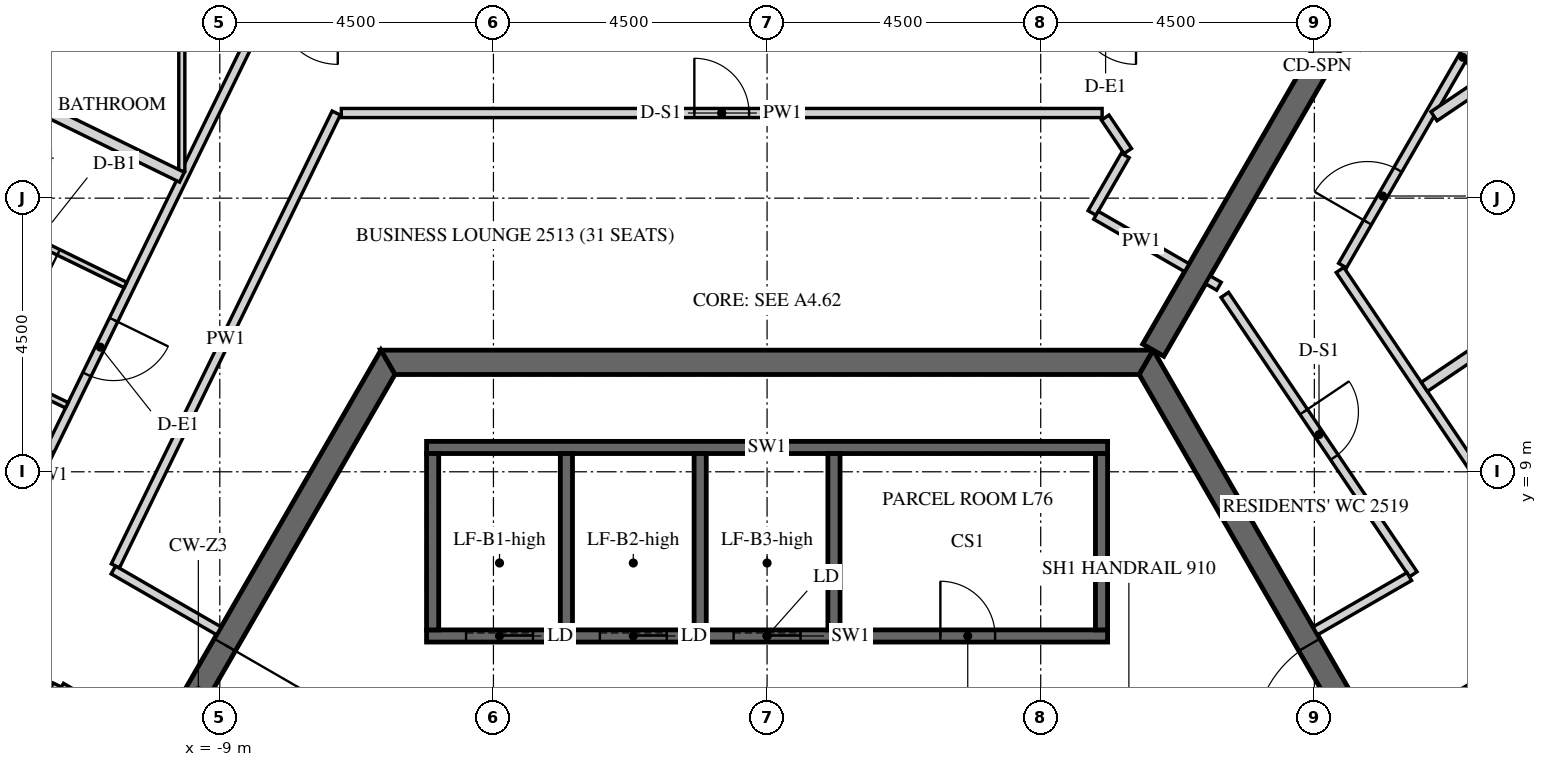
"""IFC4 building model, lengths in metres.
Left out: names, types, materials, properties, quantities, classifications, styles, units other than length and angle.
Written with IfcOpenShell. Run it as: python <this file> out.ifc"""

import sys

from ifc_helpers import new_model, si_unit, direction, frame, frame_2d, origin, place, context, subcontext, project, spatial, polyline, rectangle, outline, extrude, element, fill, save


model = new_model("IFC4")
c1 = context("Model", 3, precision=1e-05, world=origin(), true_north=direction((0.0, 1.0)))
c2 = subcontext(c1, "Body", "Model", "MODEL_VIEW")
j1 = project(units=[si_unit("LENGTHUNIT", "METRE"), si_unit("PLANEANGLEUNIT", "RADIAN")], contexts=[c1])
p1 = place(None, origin())
s1 = spatial("IfcSite", under=j1, at=p1, CompositionType="ELEMENT")
p2 = place(p1, origin())
s2 = spatial("IfcBuilding", under=s1, at=p2, CompositionType="ELEMENT")
p3 = place(p2, frame((0.0, 0.0, 314.7)))
s3 = spatial("IfcBuildingStorey", under=s2, at=p3, CompositionType="ELEMENT", Elevation=314.7)
p4 = place(p3, frame((-6.235, 10.8, -0.15), z_axis=(0.0, 0.0, 1.0), x_axis=(-0.499996419489, -0.866027470984, 0.0)))
e1 = element("IfcWall", 1, at=p4, inside=s3, PredefinedType="SHEAR", context=c2, shape_type="SweptSolid", body=[
    extrude(outline(polyline([(-0.115, -0.2), (12.586, -0.2), (12.355, 0.2), (0.115, 0.2), (-0.115, -0.2)])), origin(), (0.0, 0.0, 1.0), 3.9),
])
p5 = place(p4, frame((5.364, 0.0, 0.15)))
e2 = element("IfcOpeningElement", 2, at=p5, cuts=e1, PredefinedType="OPENING", context=c2, shape_type="SweptSolid", body=[
    extrude(rectangle(XDim=1.8, YDim=2.4, at=frame_2d((0.9, 1.2))), frame((0.0, 0.21, 0.0), z_axis=(0.0, -1.0, 0.0), x_axis=(1.0, 0.0, 0.0)), (0.0, 0.0, 1.0), 0.42),
])
p6 = place(p3, frame((12.471, 0.0, -0.15), z_axis=(0.0, 0.0, 1.0), x_axis=(-0.499996419489, 0.866027470984, 0.0)))
e3 = element("IfcWall", 3, at=p6, inside=s3, PredefinedType="SHEAR", context=c2, shape_type="SweptSolid", body=[
    extrude(outline(polyline([(-0.115, -0.2), (12.586, -0.2), (12.355, 0.2), (0.115, 0.2), (-0.115, -0.2)])), origin(), (0.0, 0.0, 1.0), 3.9),
])
p7 = place(p6, frame((5.306, 0.0, 0.15)))
e4 = element("IfcOpeningElement", 4, at=p7, cuts=e3, PredefinedType="OPENING", context=c2, shape_type="SweptSolid", body=[
    extrude(rectangle(XDim=1.8, YDim=2.4, at=frame_2d((0.9, 1.2))), frame((0.0, 0.21, 0.0), z_axis=(0.0, -1.0, 0.0), x_axis=(1.0, 0.0, 0.0)), (0.0, 0.0, 1.0), 0.42),
])
p8 = place(p3, frame((6.235, 10.8, -0.15), z_axis=(0.0, 0.0, 1.0), x_axis=(-1.0, 0.0, 0.0)))
e5 = element("IfcWall", 5, at=p8, inside=s3, PredefinedType="SHEAR", context=c2, shape_type="SweptSolid", body=[
    extrude(outline(polyline([(-0.115, -0.2), (12.586, -0.2), (12.355, 0.2), (0.115, 0.2), (-0.115, -0.2)])), origin(), (0.0, 0.0, 1.0), 3.9),
])
p9 = place(p3, frame((6.351, 11.0, -0.15), z_axis=(0.0, 0.0, 1.0), x_axis=(0.499998894578, 0.866026041999, 0.0)))
e6 = element("IfcWall", 6, at=p9, inside=s3, PredefinedType="SHEAR", context=c2, shape_type="SweptSolid", body=[
    extrude(rectangle(XDim=15.544, YDim=0.4, at=frame_2d((7.772, 0.0))), origin(), (0.0, 0.0, 1.0), 3.9),
])
p10 = place(p9, frame((6.872, 0.0, 0.15)))
e7 = element("IfcOpeningElement", 7, at=p10, cuts=e6, PredefinedType="OPENING", context=c2, shape_type="SweptSolid", body=[
    extrude(rectangle(XDim=1.8, YDim=2.4, at=frame_2d((0.9, 1.2))), frame((0.0, 0.21, 0.0), z_axis=(0.0, -1.0, 0.0), x_axis=(1.0, 0.0, 0.0)), (0.0, 0.0, 1.0), 0.42),
])
p11 = place(p3, frame((-5.6, 6.3, -0.25), z_axis=(0.0, 0.0, 1.0), x_axis=(1.0, 0.0, 0.0)))
e8 = element("IfcWall", 8, at=p11, inside=s3, PredefinedType="SHEAR", context=c2, shape_type="SweptSolid", body=[
    extrude(rectangle(XDim=11.2, YDim=0.2, at=frame_2d((5.6, 0.0))), origin(), (0.0, 0.0, 1.0), 3.9),
])
p12 = place(p11, frame((8.45, 0.0, 0.25)))
e9 = element("IfcOpeningElement", 9, at=p12, cuts=e8, PredefinedType="OPENING", context=c2, shape_type="SweptSolid", body=[
    extrude(rectangle(XDim=0.9, YDim=2.1, at=frame_2d((0.45, 1.05))), frame((0.0, 0.11, 0.0), z_axis=(0.0, -1.0, 0.0), x_axis=(1.0, 0.0, 0.0)), (0.0, 0.0, 1.0), 0.22),
])
p13 = place(p11, frame((0.65, 0.0, 0.25)))
e10 = element("IfcOpeningElement", 10, at=p13, cuts=e8, PredefinedType="OPENING", context=c2, shape_type="SweptSolid", body=[
    extrude(rectangle(XDim=1.1, YDim=2.1, at=frame_2d((0.55, 1.05))), frame((0.0, 0.11, 0.0), z_axis=(0.0, -1.0, 0.0), x_axis=(1.0, 0.0, 0.0)), (0.0, 0.0, 1.0), 0.22),
])
p14 = place(p11, frame((2.85, 0.0, 0.25)))
e11 = element("IfcOpeningElement", 11, at=p14, cuts=e8, PredefinedType="OPENING", context=c2, shape_type="SweptSolid", body=[
    extrude(rectangle(XDim=1.1, YDim=2.1, at=frame_2d((0.55, 1.05))), frame((0.0, 0.11, 0.0), z_axis=(0.0, -1.0, 0.0), x_axis=(1.0, 0.0, 0.0)), (0.0, 0.0, 1.0), 0.22),
])
p15 = place(p11, frame((5.05, 0.0, 0.25)))
e12 = element("IfcOpeningElement", 12, at=p15, cuts=e8, PredefinedType="OPENING", context=c2, shape_type="SweptSolid", body=[
    extrude(rectangle(XDim=1.1, YDim=2.1, at=frame_2d((0.55, 1.05))), frame((0.0, 0.11, 0.0), z_axis=(0.0, -1.0, 0.0), x_axis=(1.0, 0.0, 0.0)), (0.0, 0.0, 1.0), 0.22),
])
p16 = place(p3, frame((-5.6, 9.4, -0.25), z_axis=(0.0, 0.0, 1.0), x_axis=(1.0, 0.0, 0.0)))
e13 = element("IfcWall", 13, at=p16, inside=s3, PredefinedType="SHEAR", context=c2, shape_type="SweptSolid", body=[
    extrude(rectangle(XDim=11.2, YDim=0.2, at=frame_2d((5.6, 0.0))), origin(), (0.0, 0.0, 1.0), 3.9),
])
for number, where, z_axis, x_axis in (
    (14, (-5.5, 6.4, -0.25), (0.0, 0.0, 1.0), (0.0, 1.0, 0.0)),
    (15, (-3.3, 6.4, -0.25), (0.0, 0.0, 1.0), (0.0, 1.0, 0.0)),
    (16, (-1.1, 6.4, -0.25), (0.0, 0.0, 1.0), (0.0, 1.0, 0.0)),
    (17, (1.1, 6.4, -0.25), (0.0, 0.0, 1.0), (0.0, 1.0, 0.0)),
    (18, (5.5, 6.4, -0.25), (0.0, 0.0, 1.0), (0.0, 1.0, 0.0)),
):
    element("IfcWall", number, at=place(p3, frame(where, z_axis=z_axis, x_axis=x_axis)), inside=s3, PredefinedType="SHEAR", context=c2, shape_type="SweptSolid", body=[
        extrude(rectangle(XDim=2.9, YDim=0.2, at=frame_2d((1.45, 0.0))), origin(), (0.0, 0.0, 1.0), 3.9),
    ])
p17 = place(p3, frame((-8.247, 16.625, 0.0), z_axis=(0.0, 0.0, 1.0), x_axis=(-0.438381655451, -0.898788920806, 0.0)))
e19 = element("IfcWall", 19, at=p17, inside=s3, PredefinedType="PARTITIONING", context=c2, shape_type="SweptSolid", body=[
    extrude(rectangle(XDim=16.272, YDim=0.15, at=frame_2d((8.136, 0.0))), origin(), (0.0, 0.0, 1.0), 2.988),
])
p18 = place(p17, frame((5.703, 0.0, 0.0)))
e20 = element("IfcOpeningElement", 20, at=p18, cuts=e19, PredefinedType="OPENING", context=c2, shape_type="SweptSolid", body=[
    extrude(rectangle(XDim=1.0, YDim=2.1, at=frame_2d((0.5, 1.05))), frame((0.0, 0.085, 0.0), z_axis=(0.0, -1.0, 0.0), x_axis=(1.0, 0.0, 0.0)), (0.0, 0.0, 1.0), 0.17),
])
p19 = place(p3, frame((-9.016, 6.384, 0.0), z_axis=(0.0, 0.0, 1.0), x_axis=(-0.866029291668, 0.499993265928, 0.0)))
e21 = element("IfcWall", 21, at=p19, inside=s3, PredefinedType="PARTITIONING", context=c2, shape_type="SweptSolid", body=[
    extrude(rectangle(XDim=2.003, YDim=0.15, at=frame_2d((1.001, 0.0))), origin(), (0.0, 0.0, 1.0), 2.988),
])
p20 = place(p3, frame((-10.717, 7.453, 0.0), z_axis=(0.0, 0.0, 1.0), x_axis=(0.438363251035, 0.898797897273, 0.0)))
e22 = element("IfcWall", 22, at=p20, inside=s3, PredefinedType="PARTITIONING", context=c2, shape_type="SweptSolid", body=[
    extrude(rectangle(XDim=8.285, YDim=0.15, at=frame_2d((4.143, 0.0))), origin(), (0.0, 0.0, 1.0), 2.988),
])
p21 = place(p3, frame((-7.002, 14.9, 0.0), z_axis=(0.0, 0.0, 1.0), x_axis=(1.0, 0.0, 0.0)))
e23 = element("IfcWall", 23, at=p21, inside=s3, PredefinedType="PARTITIONING", context=c2, shape_type="SweptSolid", body=[
    extrude(rectangle(XDim=12.512, YDim=0.15, at=frame_2d((6.256, 0.0))), origin(), (0.0, 0.0, 1.0), 2.988),
])
p22 = place(p21, frame((5.806, 0.0, 0.0)))
e24 = element("IfcOpeningElement", 24, at=p22, cuts=e23, PredefinedType="OPENING", context=c2, shape_type="SweptSolid", body=[
    extrude(rectangle(XDim=0.9, YDim=2.1, at=frame_2d((0.45, 1.05))), frame((0.0, 0.085, 0.0), z_axis=(0.0, -1.0, 0.0), x_axis=(1.0, 0.0, 0.0)), (0.0, 0.0, 1.0), 0.17),
])
p23 = place(p3, frame((5.561, 14.825, 0.0), z_axis=(0.0, 0.0, 1.0), x_axis=(0.559188682258, -0.829040419784, 0.0)))
e25 = element("IfcWall", 25, at=p23, inside=s3, PredefinedType="PARTITIONING", context=c2, shape_type="SweptSolid", body=[
    extrude(rectangle(XDim=0.664, YDim=0.15, at=frame_2d((0.332, 0.0))), origin(), (0.0, 0.0, 1.0), 2.988),
])
p24 = place(p3, frame((5.89, 14.202, 0.0), z_axis=(0.0, 0.0, 1.0), x_axis=(-0.499986987217, -0.866032916588, 0.0)))
e26 = element("IfcWall", 26, at=p24, inside=s3, PredefinedType="PARTITIONING", context=c2, shape_type="SweptSolid", body=[
    extrude(rectangle(XDim=1.092, YDim=0.15, at=frame_2d((0.546, 0.0))), origin(), (0.0, 0.0, 1.0), 2.988),
])
p25 = place(p3, frame((5.409, 13.219, 0.0), z_axis=(0.0, 0.0, 1.0), x_axis=(0.866013532718, -0.500020560727, 0.0)))
e27 = element("IfcWall", 27, at=p25, inside=s3, PredefinedType="PARTITIONING", context=c2, shape_type="SweptSolid", body=[
    extrude(rectangle(XDim=1.725, YDim=0.15, at=frame_2d((0.863, 0.0))), origin(), (0.0, 0.0, 1.0), 2.988),
])
p26 = place(p3, frame((-14.078, 0.564, 0.0), z_axis=(0.0, 0.0, 1.0), x_axis=(0.438378907599, 0.898790261058, 0.0)))
e28 = element("IfcWall", 28, at=p26, inside=s3, PredefinedType="PARTITIONING", context=c2, shape_type="SweptSolid", body=[
    extrude(rectangle(XDim=5.485, YDim=0.15, at=frame_2d((2.743, 0.0))), origin(), (0.0, 0.0, 1.0), 2.988),
])
p27 = place(p26, frame((2.292, 0.0, 0.0)))
e29 = element("IfcOpeningElement", 29, at=p27, cuts=e28, PredefinedType="OPENING", context=c2, shape_type="SweptSolid", body=[
    extrude(rectangle(XDim=0.9, YDim=2.1, at=frame_2d((0.45, 1.05))), frame((0.0, 0.085, 0.0), z_axis=(0.0, -1.0, 0.0), x_axis=(1.0, 0.0, 0.0)), (0.0, 0.0, 1.0), 0.17),
])
p28 = place(p3, frame((-11.608, 5.456, 0.0), z_axis=(0.0, 0.0, 1.0), x_axis=(0.866032625367, -0.499987491644, 0.0)))
e30 = element("IfcWall", 30, at=p28, inside=s3, PredefinedType="PARTITIONING", context=c2, shape_type="SweptSolid", body=[
    extrude(rectangle(XDim=1.781, YDim=0.15, at=frame_2d((0.89, 0.0))), origin(), (0.0, 0.0, 1.0), 2.988),
])
p29 = place(p3, frame((18.521, -1.171, 0.0), z_axis=(0.0, 0.0, 1.0), x_axis=(-0.559193232449, 0.829037350656, 0.0)))
e31 = element("IfcWall", 31, at=p29, inside=s3, PredefinedType="PARTITIONING", context=c2, shape_type="SweptSolid", body=[
    extrude(rectangle(XDim=16.272, YDim=0.15, at=frame_2d((8.136, 0.0))), origin(), (0.0, 0.0, 1.0), 2.988),
])
p30 = place(p29, frame((3.703, 0.0, 0.0)))
e32 = element("IfcOpeningElement", 32, at=p30, cuts=e31, PredefinedType="OPENING", context=c2, shape_type="SweptSolid", body=[
    extrude(rectangle(XDim=1.0, YDim=2.1, at=frame_2d((0.5, 1.05))), frame((0.0, 0.085, 0.0), z_axis=(0.0, -1.0, 0.0), x_axis=(1.0, 0.0, 0.0)), (0.0, 0.0, 1.0), 0.17),
])
p31 = place(p3, frame((9.464, 12.392, 0.0), z_axis=(0.0, 0.0, 1.0), x_axis=(0.499999400414, 0.866025749955, 0.0)))
e33 = element("IfcWall", 33, at=p31, inside=s3, PredefinedType="PARTITIONING", context=c2, shape_type="SweptSolid", body=[
    extrude(rectangle(XDim=7.911, YDim=0.15, at=frame_2d((3.955, 0.0))), origin(), (0.0, 0.0, 1.0), 2.988),
])
p32 = place(p31, frame((0.82, 0.0, 0.0)))
e34 = element("IfcOpeningElement", 34, at=p32, cuts=e33, PredefinedType="OPENING", context=c2, shape_type="SweptSolid", body=[
    extrude(rectangle(XDim=1.0, YDim=2.1, at=frame_2d((0.5, 1.05))), frame((0.0, 0.085, 0.0), z_axis=(0.0, -1.0, 0.0), x_axis=(1.0, 0.0, 0.0)), (0.0, 0.0, 1.0), 0.17),
])
p33 = place(p31, frame((4.817, 0.0, 0.0)))
e35 = element("IfcOpeningElement", 35, at=p33, cuts=e33, PredefinedType="OPENING", context=c2, shape_type="SweptSolid", body=[
    extrude(rectangle(XDim=1.0, YDim=2.1, at=frame_2d((0.5, 1.05))), frame((0.0, 0.085, 0.0), z_axis=(0.0, -1.0, 0.0), x_axis=(1.0, 0.0, 0.0)), (0.0, 0.0, 1.0), 0.17),
])
p34 = place(p3, frame((10.066, 4.566, 0.0), z_axis=(0.0, 0.0, 1.0), x_axis=(0.866033651025, 0.499985715088, 0.0)))
e36 = element("IfcWall", 36, at=p34, inside=s3, PredefinedType="PARTITIONING", context=c2, shape_type="SweptSolid", body=[
    extrude(rectangle(XDim=2.007, YDim=0.15, at=frame_2d((1.003, 0.0))), origin(), (0.0, 0.0, 1.0), 2.988),
])
p35 = place(p3, frame((7.25, 12.156, 0.0), z_axis=(0.0, 0.0, 1.0), x_axis=(0.866088799389, -0.499890179513, 0.0)))
e37 = element("IfcWall", 37, at=p35, inside=s3, PredefinedType="PARTITIONING", context=c2, shape_type="SweptSolid", body=[
    extrude(rectangle(XDim=0.21, YDim=0.15, at=frame_2d((0.105, 0.0))), origin(), (0.0, 0.0, 1.0), 2.988),
])
p36 = place(p3, frame((7.527, 11.91, 0.0), z_axis=(0.0, 0.0, 1.0), x_axis=(0.5592050336, -0.82902939055, 0.0)))
e38 = element("IfcWall", 38, at=p36, inside=s3, PredefinedType="PARTITIONING", context=c2, shape_type="SweptSolid", body=[
    extrude(rectangle(XDim=5.543, YDim=0.15, at=frame_2d((2.771, 0.0))), origin(), (0.0, 0.0, 1.0), 2.988),
])
p37 = place(p36, frame((2.322, 0.0, 0.0)))
e39 = element("IfcOpeningElement", 39, at=p37, cuts=e38, PredefinedType="OPENING", context=c2, shape_type="SweptSolid", body=[
    extrude(rectangle(XDim=0.9, YDim=2.1, at=frame_2d((0.45, 1.05))), frame((0.0, 0.085, 0.0), z_axis=(0.0, -1.0, 0.0), x_axis=(1.0, 0.0, 0.0)), (0.0, 0.0, 1.0), 0.17),
])
p38 = place(p3, frame((10.562, 7.277, 0.0), z_axis=(0.0, 0.0, 1.0), x_axis=(-0.86601248742, -0.500022371132, 0.0)))
e40 = element("IfcWall", 40, at=p38, inside=s3, PredefinedType="PARTITIONING", context=c2, shape_type="SweptSolid", body=[
    extrude(rectangle(XDim=1.785, YDim=0.15, at=frame_2d((0.893, 0.0))), origin(), (0.0, 0.0, 1.0), 2.988),
])
p39 = place(p3, frame((-9.625, 13.945, 0.0), z_axis=(0.0, 0.0, 1.0), x_axis=(0.0, 1.0, 0.0)))
e41 = element("IfcWall", 41, at=p39, inside=s3, PredefinedType="PARTITIONING", context=c2, shape_type="SweptSolid", body=[
    extrude(rectangle(XDim=6.155, YDim=0.1, at=frame_2d((3.077, 0.0))), origin(), (0.0, 0.0, 1.0), 2.988),
])
p40 = place(p39, frame((4.005, 0.0, 0.0)))
e42 = element("IfcOpeningElement", 42, at=p40, cuts=e41, PredefinedType="OPENING", context=c2, shape_type="SweptSolid", body=[
    extrude(rectangle(XDim=0.9, YDim=2.1, at=frame_2d((0.45, 1.05))), frame((0.0, 0.06, 0.0), z_axis=(0.0, -1.0, 0.0), x_axis=(1.0, 0.0, 0.0)), (0.0, 0.0, 1.0), 0.12),
])
p41 = place(p3, frame((-17.516, 17.694, 0.0), z_axis=(0.0, 0.0, 1.0), x_axis=(0.898787414812, -0.438384743092, 0.0)))
e43 = element("IfcWall", 43, at=p41, inside=s3, PredefinedType="PARTITIONING", context=c2, shape_type="SweptSolid", body=[
    extrude(rectangle(XDim=8.782, YDim=0.18, at=frame_2d((4.391, 0.0))), origin(), (0.0, 0.0, 1.0), 2.988),
])
p42 = place(p3, frame((-11.515, 10.094, 0.0), z_axis=(0.0, 0.0, 1.0), x_axis=(-0.898774796437, 0.438410612656, 0.0)))
e44 = element("IfcWall", 44, at=p42, inside=s3, PredefinedType="PARTITIONING", context=c2, shape_type="SweptSolid", body=[
    extrude(rectangle(XDim=3.325, YDim=0.1, at=frame_2d((1.663, 0.0))), origin(), (0.0, 0.0, 1.0), 2.988),
])
p43 = place(p42, frame((1.175, 0.0, 0.0)))
e45 = element("IfcOpeningElement", 45, at=p43, cuts=e44, PredefinedType="OPENING", context=c2, shape_type="SweptSolid", body=[
    extrude(rectangle(XDim=0.9, YDim=2.1, at=frame_2d((0.45, 1.05))), frame((0.0, 0.06, 0.0), z_axis=(0.0, -1.0, 0.0), x_axis=(1.0, 0.0, 0.0)), (0.0, 0.0, 1.0), 0.12),
])
p44 = place(p3, frame((-10.551, 12.072, 0.0), z_axis=(0.0, 0.0, 1.0), x_axis=(-0.898803726577, 0.438351298723, 0.0)))
e46 = element("IfcWall", 46, at=p44, inside=s3, PredefinedType="PARTITIONING", context=c2, shape_type="SweptSolid", body=[
    extrude(rectangle(XDim=3.325, YDim=0.1, at=frame_2d((1.663, 0.0))), origin(), (0.0, 0.0, 1.0), 2.988),
])
p45 = place(p44, frame((1.225, 0.0, 0.0)))
e47 = element("IfcOpeningElement", 47, at=p45, cuts=e46, PredefinedType="OPENING", context=c2, shape_type="SweptSolid", body=[
    extrude(rectangle(XDim=0.8, YDim=2.1, at=frame_2d((0.4, 1.05))), frame((0.0, 0.06, 0.0), z_axis=(0.0, -1.0, 0.0), x_axis=(1.0, 0.0, 0.0)), (0.0, 0.0, 1.0), 0.12),
])
p46 = place(p3, frame((18.042, 15.276, 0.0), z_axis=(0.0, 0.0, 1.0), x_axis=(-0.829028989438, -0.559205628254, 0.0)))
e48 = element("IfcWall", 48, at=p46, inside=s3, PredefinedType="PARTITIONING", context=c2, shape_type="SweptSolid", body=[
    extrude(rectangle(XDim=8.725, YDim=0.18, at=frame_2d((4.363, 0.0))), origin(), (0.0, 0.0, 1.0), 2.988),
])
p47 = place(p3, frame((16.029, 18.26, 0.0), z_axis=(0.0, 0.0, 1.0), x_axis=(-0.829048418375, -0.559176823545, 0.0)))
e49 = element("IfcWall", 49, at=p47, inside=s3, PredefinedType="PARTITIONING", context=c2, shape_type="SweptSolid", body=[
    extrude(rectangle(XDim=6.105, YDim=0.18, at=frame_2d((3.053, 0.0))), origin(), (0.0, 0.0, 1.0), 2.988),
])
p48 = place(p5, origin())
e50 = element("IfcDoor", 50, at=p48, inside=s3, OperationType="DOUBLE_DOOR_SINGLE_SWING", PredefinedType="DOOR", context=c2, shape_type="SweptSolid", body=[
    extrude(rectangle(XDim=1.8, YDim=2.4, at=frame_2d((0.9, 1.2))), frame((0.0, 0.025, 0.0), z_axis=(0.0, -1.0, 0.0), x_axis=(1.0, 0.0, 0.0)), (0.0, 0.0, 1.0), 0.05),
])
fill(e2, e50)
p49 = place(p7, origin())
e51 = element("IfcDoor", 51, at=p49, inside=s3, OperationType="DOUBLE_DOOR_SINGLE_SWING", PredefinedType="DOOR", context=c2, shape_type="SweptSolid", body=[
    extrude(rectangle(XDim=1.8, YDim=2.4, at=frame_2d((0.9, 1.2))), frame((0.0, 0.025, 0.0), z_axis=(0.0, -1.0, 0.0), x_axis=(1.0, 0.0, 0.0)), (0.0, 0.0, 1.0), 0.05),
])
fill(e4, e51)
p50 = place(p12, origin())
e52 = element("IfcDoor", 52, at=p50, inside=s3, OperationType="SINGLE_SWING_LEFT", PredefinedType="DOOR", context=c2, shape_type="SweptSolid", body=[
    extrude(rectangle(XDim=0.9, YDim=2.1, at=frame_2d((0.45, 1.05))), frame((0.0, 0.025, 0.0), z_axis=(0.0, -1.0, 0.0), x_axis=(1.0, 0.0, 0.0)), (0.0, 0.0, 1.0), 0.05),
])
fill(e9, e52)
p51 = place(p13, origin())
e53 = element("IfcDoor", 53, at=p51, inside=s3, OperationType="SLIDING_TO_LEFT", PredefinedType="DOOR", context=c2, shape_type="SweptSolid", body=[
    extrude(rectangle(XDim=1.1, YDim=2.1, at=frame_2d((0.55, 1.05))), frame((0.0, 0.025, 0.0), z_axis=(0.0, -1.0, 0.0), x_axis=(1.0, 0.0, 0.0)), (0.0, 0.0, 1.0), 0.05),
])
fill(e10, e53)
p52 = place(p14, origin())
e54 = element("IfcDoor", 54, at=p52, inside=s3, OperationType="SLIDING_TO_LEFT", PredefinedType="DOOR", context=c2, shape_type="SweptSolid", body=[
    extrude(rectangle(XDim=1.1, YDim=2.1, at=frame_2d((0.55, 1.05))), frame((0.0, 0.025, 0.0), z_axis=(0.0, -1.0, 0.0), x_axis=(1.0, 0.0, 0.0)), (0.0, 0.0, 1.0), 0.05),
])
fill(e11, e54)
p53 = place(p15, origin())
e55 = element("IfcDoor", 55, at=p53, inside=s3, OperationType="SLIDING_TO_LEFT", PredefinedType="DOOR", context=c2, shape_type="SweptSolid", body=[
    extrude(rectangle(XDim=1.1, YDim=2.1, at=frame_2d((0.55, 1.05))), frame((0.0, 0.025, 0.0), z_axis=(0.0, -1.0, 0.0), x_axis=(1.0, 0.0, 0.0)), (0.0, 0.0, 1.0), 0.05),
])
fill(e12, e55)
p54 = place(p18, origin())
e56 = element("IfcDoor", 56, at=p54, inside=s3, OperationType="SINGLE_SWING_LEFT", PredefinedType="DOOR", context=c2, shape_type="SweptSolid", body=[
    extrude(rectangle(XDim=1.0, YDim=2.1, at=frame_2d((0.5, 1.05))), frame((0.0, 0.025, 0.0), z_axis=(0.0, -1.0, 0.0), x_axis=(1.0, 0.0, 0.0)), (0.0, 0.0, 1.0), 0.05),
])
fill(e20, e56)
p55 = place(p45, origin())
e57 = element("IfcDoor", 57, at=p55, inside=s3, OperationType="SINGLE_SWING_RIGHT", PredefinedType="DOOR", context=c2, shape_type="SweptSolid", body=[
    extrude(rectangle(XDim=0.8, YDim=2.1, at=frame_2d((0.4, 1.05))), frame((0.0, 0.025, 0.0), z_axis=(0.0, -1.0, 0.0), x_axis=(1.0, 0.0, 0.0)), (0.0, 0.0, 1.0), 0.05),
])
fill(e47, e57)
p56 = place(p32, origin())
e58 = element("IfcDoor", 58, at=p56, inside=s3, OperationType="SINGLE_SWING_RIGHT", PredefinedType="DOOR", context=c2, shape_type="SweptSolid", body=[
    extrude(rectangle(XDim=1.0, YDim=2.1, at=frame_2d((0.5, 1.05))), frame((0.0, 0.025, 0.0), z_axis=(0.0, -1.0, 0.0), x_axis=(1.0, 0.0, 0.0)), (0.0, 0.0, 1.0), 0.05),
])
fill(e34, e58)
p57 = place(p22, origin())
e59 = element("IfcDoor", 59, at=p57, inside=s3, OperationType="SINGLE_SWING_LEFT", PredefinedType="DOOR", context=c2, shape_type="SweptSolid", body=[
    extrude(rectangle(XDim=0.9, YDim=2.1, at=frame_2d((0.45, 1.05))), frame((0.0, 0.025, 0.0), z_axis=(0.0, -1.0, 0.0), x_axis=(1.0, 0.0, 0.0)), (0.0, 0.0, 1.0), 0.05),
])
fill(e24, e59)
p58 = place(p37, origin())
e60 = element("IfcDoor", 60, at=p58, inside=s3, OperationType="SINGLE_SWING_RIGHT", PredefinedType="DOOR", context=c2, shape_type="SweptSolid", body=[
    extrude(rectangle(XDim=0.9, YDim=2.1, at=frame_2d((0.45, 1.05))), frame((0.0, 0.025, 0.0), z_axis=(0.0, -1.0, 0.0), x_axis=(1.0, 0.0, 0.0)), (0.0, 0.0, 1.0), 0.05),
])
fill(e39, e60)
save(model, sys.argv[1])
